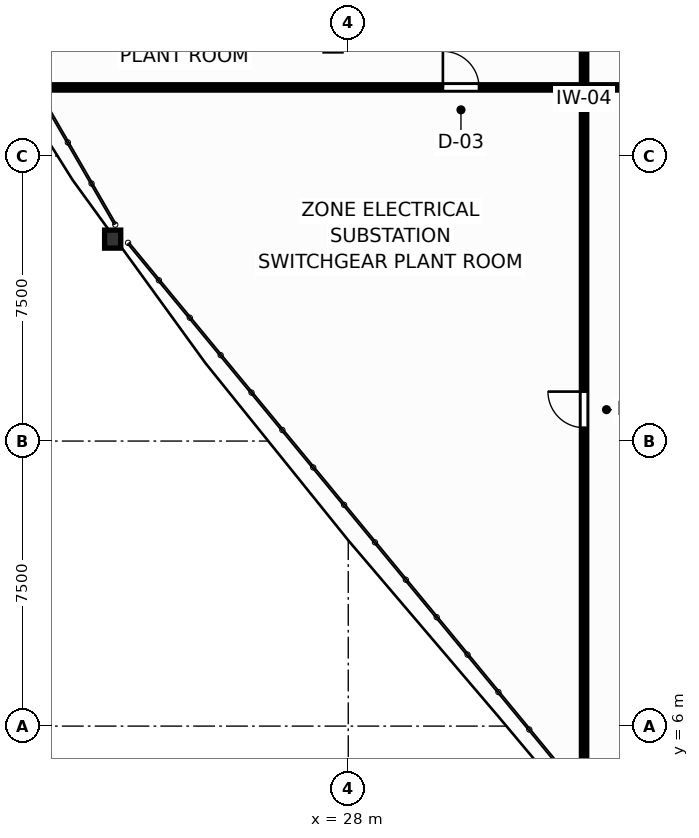
"""IFC4 building model, lengths in metres.
Left out: names, types, materials, properties, quantities, classifications, styles, units other than length and angle.
Written with IfcOpenShell. Run it as: python <this file> out.ifc"""

import sys

from ifc_helpers import new_model, si_unit, direction, frame, frame_2d, origin, origin_2d, place, context, subcontext, project, spatial, rectangle, i_section, extrude, source, transform, mapped, element, fill, save


model = new_model("IFC4")
c1 = context("Model", 3, precision=1e-05, world=origin(), true_north=direction((0.0, 1.0)))
c2 = subcontext(c1, "Body", "Model", "MODEL_VIEW")
j1 = project(units=[si_unit("LENGTHUNIT", "METRE"), si_unit("PLANEANGLEUNIT", "RADIAN")], contexts=[c1])
p1 = place(None, origin())
s1 = spatial("IfcSite", under=j1, at=p1, CompositionType="ELEMENT")
p2 = place(p1, origin())
s2 = spatial("IfcBuilding", under=s1, at=p2, CompositionType="ELEMENT")
p3 = place(p2, frame((0.0, 0.0, 59.1)))
s3 = spatial("IfcBuildingStorey", under=s2, at=p3, CompositionType="ELEMENT", Elevation=59.1)
m1 = source(origin(), c2, "Body", "SweptSolid", [
    extrude(i_section(OverallWidth=0.424, OverallDepth=0.474, WebThickness=0.045, FlangeThickness=0.072, FilletRadius=0.015, at=origin_2d()), origin(), (0.0, 0.0, 1.0), 4.8),
])
p4 = place(p3, frame((21.802, 18.813, 0.0), z_axis=(0.0, 0.0, 1.0), x_axis=(1.0, 0.0, 0.0)))
e1 = element("IfcColumn", 1, at=p4, inside=s3, PredefinedType="COLUMN", context=c2, shape_type="MappedRepresentation", body=[
    mapped(m1, transform((0.0, 0.0, 0.0), scale=1.0)),
])
p5 = place(p3, frame((19.517, 22.805, 0.0), z_axis=(0.0, 0.0, 1.0), x_axis=(1.0, 0.0, 0.0)))
e2 = element("IfcWall", 2, at=p5, inside=s3, PredefinedType="PARTITIONING", context=c2, shape_type="SweptSolid", body=[
    extrude(rectangle(XDim=32.966, YDim=0.14, at=frame_2d((16.483, 0.0))), origin(), (0.0, 0.0, 1.0), 4.58),
])
p6 = place(p5, frame((10.973, 0.0, 0.0)))
e3 = element("IfcOpeningElement", 3, at=p6, cuts=e2, PredefinedType="OPENING", context=c2, shape_type="SweptSolid", body=[
    extrude(rectangle(XDim=0.95, YDim=2.05, at=frame_2d((0.475, 1.025))), frame((0.0, 0.08, 0.0), z_axis=(0.0, -1.0, 0.0), x_axis=(1.0, 0.0, 0.0)), (0.0, 0.0, 1.0), 0.16),
])
p7 = place(p3, frame((34.205, 4.529, 0.0), z_axis=(0.0, 0.0, 1.0), x_axis=(0.0, 1.0, 0.0)))
e4 = element("IfcWall", 4, at=p7, inside=s3, PredefinedType="PARTITIONING", context=c2, shape_type="SweptSolid", body=[
    extrude(rectangle(XDim=23.714, YDim=0.14, at=frame_2d((11.857, 0.0))), origin(), (0.0, 0.0, 1.0), 2.57),
])
p8 = place(p7, frame((9.322, 0.0, 0.0)))
e5 = element("IfcOpeningElement", 5, at=p8, cuts=e4, PredefinedType="OPENING", context=c2, shape_type="SweptSolid", body=[
    extrude(rectangle(XDim=0.95, YDim=2.05, at=frame_2d((0.475, 1.025))), frame((0.0, 0.08, 0.0), z_axis=(0.0, -1.0, 0.0), x_axis=(1.0, 0.0, 0.0)), (0.0, 0.0, 1.0), 0.16),
])
p9 = place(p6, origin())
e6 = element("IfcDoor", 6, at=p9, inside=s3, OperationType="SINGLE_SWING_LEFT", PredefinedType="DOOR", context=c2, shape_type="SweptSolid", body=[
    extrude(rectangle(XDim=0.95, YDim=2.05, at=frame_2d((0.475, 1.025))), frame((0.0, 0.025, 0.0), z_axis=(0.0, -1.0, 0.0), x_axis=(1.0, 0.0, 0.0)), (0.0, 0.0, 1.0), 0.05),
])
fill(e3, e6)
p10 = place(p8, origin())
e7 = element("IfcDoor", 7, at=p10, inside=s3, OperationType="SINGLE_SWING_RIGHT", PredefinedType="DOOR", context=c2, shape_type="SweptSolid", body=[
    extrude(rectangle(XDim=0.95, YDim=2.05, at=frame_2d((0.475, 1.025))), frame((0.0, 0.025, 0.0), z_axis=(0.0, -1.0, 0.0), x_axis=(1.0, 0.0, 0.0)), (0.0, 0.0, 1.0), 0.05),
])
fill(e5, e7)
save(model, sys.argv[1])
